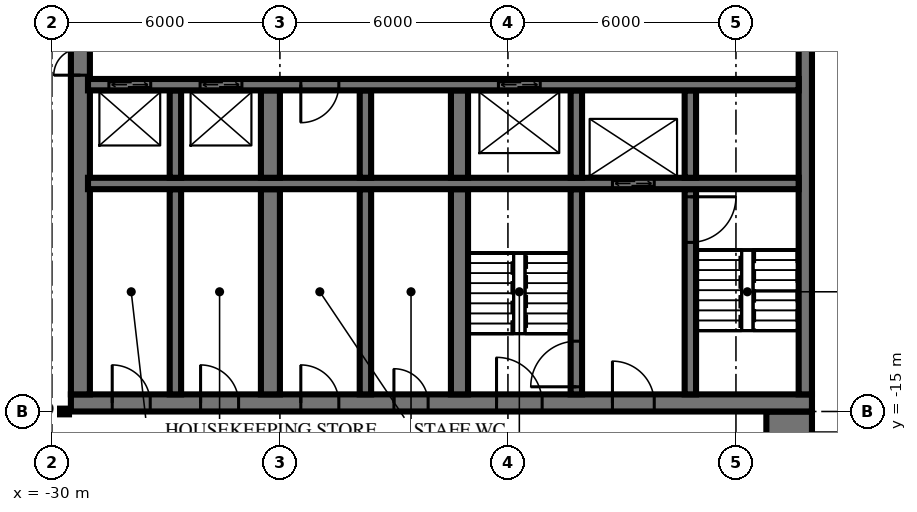
"""IFC4 building model, lengths in metres.
Left out: names, types, materials, properties, quantities, classifications, styles, units other than length and angle.
Written with IfcOpenShell. Run it as: python <this file> out.ifc"""

import sys

from ifc_helpers import new_model, si_unit, direction, frame, frame_2d, origin, place, context, subcontext, project, spatial, rectangle, extrude, element, fill, save


model = new_model("IFC4")
c1 = context("Model", 3, precision=1e-05, world=origin(), true_north=direction((0.0, 1.0)))
c2 = subcontext(c1, "Body", "Model", "MODEL_VIEW")
j1 = project(units=[si_unit("LENGTHUNIT", "METRE"), si_unit("PLANEANGLEUNIT", "RADIAN")], contexts=[c1])
p1 = place(None, origin())
s1 = spatial("IfcSite", under=j1, at=p1, CompositionType="ELEMENT")
p2 = place(p1, origin())
s2 = spatial("IfcBuilding", under=s1, at=p2, CompositionType="ELEMENT")
p3 = place(p2, frame((0.0, 0.0, 12.5)))
s3 = spatial("IfcBuildingStorey", under=s2, at=p3, CompositionType="ELEMENT", Elevation=12.5)
p4 = place(p3, frame((-29.5, -14.775, 0.0), z_axis=(0.0, 0.0, 1.0), x_axis=(1.0, 0.0, 0.0)))
e1 = element("IfcWall", 1, at=p4, inside=s3, PredefinedType="SHEAR", context=c2, shape_type="SweptSolid", body=[
    extrude(rectangle(XDim=19.5, YDim=0.45, at=frame_2d((9.75, 0.0))), origin(), (0.0, 0.0, 1.0), 5.5),
])
p5 = place(p4, frame((11.2, 0.0, 0.0)))
e2 = element("IfcOpeningElement", 2, at=p5, cuts=e1, PredefinedType="OPENING", context=c2, shape_type="SweptSolid", body=[
    extrude(rectangle(XDim=1.2, YDim=2.1, at=frame_2d((0.6, 1.05))), frame((0.0, 0.235, 0.0), z_axis=(0.0, -1.0, 0.0), x_axis=(1.0, 0.0, 0.0)), (0.0, 0.0, 1.0), 0.47),
])
p6 = place(p4, frame((14.25, 0.0, 0.0)))
e3 = element("IfcOpeningElement", 3, at=p6, cuts=e1, PredefinedType="OPENING", context=c2, shape_type="SweptSolid", body=[
    extrude(rectangle(XDim=1.1, YDim=2.1, at=frame_2d((0.55, 1.05))), frame((0.0, 0.235, 0.0), z_axis=(0.0, -1.0, 0.0), x_axis=(1.0, 0.0, 0.0)), (0.0, 0.0, 1.0), 0.47),
])
p7 = place(p4, frame((8.5, 0.0, 0.0)))
e4 = element("IfcOpeningElement", 4, at=p7, cuts=e1, PredefinedType="OPENING", context=c2, shape_type="SweptSolid", body=[
    extrude(rectangle(XDim=0.9, YDim=2.1, at=frame_2d((0.45, 1.05))), frame((0.0, 0.235, 0.0), z_axis=(0.0, -1.0, 0.0), x_axis=(1.0, 0.0, 0.0)), (0.0, 0.0, 1.0), 0.47),
])
p8 = place(p4, frame((6.05, 0.0, 0.0)))
e5 = element("IfcOpeningElement", 5, at=p8, cuts=e1, PredefinedType="OPENING", context=c2, shape_type="SweptSolid", body=[
    extrude(rectangle(XDim=1.0, YDim=2.1, at=frame_2d((0.5, 1.05))), frame((0.0, 0.235, 0.0), z_axis=(0.0, -1.0, 0.0), x_axis=(1.0, 0.0, 0.0)), (0.0, 0.0, 1.0), 0.47),
])
p9 = place(p4, frame((3.413, 0.0, 0.0)))
e6 = element("IfcOpeningElement", 6, at=p9, cuts=e1, PredefinedType="OPENING", context=c2, shape_type="SweptSolid", body=[
    extrude(rectangle(XDim=1.0, YDim=2.1, at=frame_2d((0.5, 1.05))), frame((0.0, 0.235, 0.0), z_axis=(0.0, -1.0, 0.0), x_axis=(1.0, 0.0, 0.0)), (0.0, 0.0, 1.0), 0.47),
])
p10 = place(p4, frame((1.087, 0.0, 0.0)))
e7 = element("IfcOpeningElement", 7, at=p10, cuts=e1, PredefinedType="OPENING", context=c2, shape_type="SweptSolid", body=[
    extrude(rectangle(XDim=1.0, YDim=2.1, at=frame_2d((0.5, 1.05))), frame((0.0, 0.235, 0.0), z_axis=(0.0, -1.0, 0.0), x_axis=(1.0, 0.0, 0.0)), (0.0, 0.0, 1.0), 0.47),
])
p11 = place(p3, frame((-10.175, -14.55, 0.0), z_axis=(0.0, 0.0, 1.0), x_axis=(0.0, 1.0, 0.0)))
e8 = element("IfcWall", 8, at=p11, inside=s3, PredefinedType="SHEAR", context=c2, shape_type="SweptSolid", body=[
    extrude(rectangle(XDim=14.1, YDim=0.35, at=frame_2d((7.05, 0.0))), origin(), (0.0, 0.0, 1.0), 5.5),
])
p12 = place(p3, frame((-29.25, -14.55, 0.0), z_axis=(0.0, 0.0, 1.0), x_axis=(0.0, 1.0, 0.0)))
e9 = element("IfcWall", 9, at=p12, inside=s3, PredefinedType="SHEAR", context=c2, shape_type="SweptSolid", body=[
    extrude(rectangle(XDim=14.1, YDim=0.5, at=frame_2d((7.05, 0.0))), origin(), (0.0, 0.0, 1.0), 5.5),
])
p13 = place(p12, frame((8.4, 0.0, 0.0)))
e10 = element("IfcOpeningElement", 10, at=p13, cuts=e9, PredefinedType="OPENING", context=c2, shape_type="SweptSolid", body=[
    extrude(rectangle(XDim=1.4, YDim=2.4, at=frame_2d((0.7, 1.2))), frame((0.0, 0.26, 0.0), z_axis=(0.0, -1.0, 0.0), x_axis=(1.0, 0.0, 0.0)), (0.0, 0.0, 1.0), 0.52),
])
p14 = place(p12, frame((10.0, 0.0, 0.0)))
e11 = element("IfcOpeningElement", 11, at=p14, cuts=e9, PredefinedType="OPENING", context=c2, shape_type="SweptSolid", body=[
    extrude(rectangle(XDim=1.4, YDim=2.4, at=frame_2d((0.7, 1.2))), frame((0.0, 0.26, 0.0), z_axis=(0.0, -1.0, 0.0), x_axis=(1.0, 0.0, 0.0)), (0.0, 0.0, 1.0), 0.52),
])
p15 = place(p3, frame((-29.05, -6.4, 0.0), z_axis=(0.0, 0.0, 1.0), x_axis=(1.0, 0.0, 0.0)))
e12 = element("IfcWall", 12, at=p15, inside=s3, PredefinedType="SHEAR", context=c2, shape_type="SweptSolid", body=[
    extrude(rectangle(XDim=18.7, YDim=0.3, at=frame_2d((9.35, 0.0))), origin(), (0.0, 0.0, 1.0), 5.5),
])
p16 = place(p15, frame((2.95, 0.0, 0.0)))
e13 = element("IfcOpeningElement", 13, at=p16, cuts=e12, PredefinedType="OPENING", context=c2, shape_type="SweptSolid", body=[
    extrude(rectangle(XDim=1.1, YDim=2.1, at=frame_2d((0.55, 1.05))), frame((0.0, 0.16, 0.0), z_axis=(0.0, -1.0, 0.0), x_axis=(1.0, 0.0, 0.0)), (0.0, 0.0, 1.0), 0.32),
])
p17 = place(p15, frame((0.55, 0.0, 0.0)))
e14 = element("IfcOpeningElement", 14, at=p17, cuts=e12, PredefinedType="OPENING", context=c2, shape_type="SweptSolid", body=[
    extrude(rectangle(XDim=1.1, YDim=2.1, at=frame_2d((0.55, 1.05))), frame((0.0, 0.16, 0.0), z_axis=(0.0, -1.0, 0.0), x_axis=(1.0, 0.0, 0.0)), (0.0, 0.0, 1.0), 0.32),
])
p18 = place(p15, frame((10.8, 0.0, 0.0)))
e15 = element("IfcOpeningElement", 15, at=p18, cuts=e12, PredefinedType="OPENING", context=c2, shape_type="SweptSolid", body=[
    extrude(rectangle(XDim=1.1, YDim=2.1, at=frame_2d((0.55, 1.05))), frame((0.0, 0.16, 0.0), z_axis=(0.0, -1.0, 0.0), x_axis=(1.0, 0.0, 0.0)), (0.0, 0.0, 1.0), 0.32),
])
p19 = place(p15, frame((5.6, 0.0, 0.0)))
e16 = element("IfcOpeningElement", 16, at=p19, cuts=e12, PredefinedType="OPENING", context=c2, shape_type="SweptSolid", body=[
    extrude(rectangle(XDim=1.0, YDim=2.1, at=frame_2d((0.5, 1.05))), frame((0.0, 0.16, 0.0), z_axis=(0.0, -1.0, 0.0), x_axis=(1.0, 0.0, 0.0)), (0.0, 0.0, 1.0), 0.32),
])
p20 = place(p3, frame((-29.05, -9.0, 0.0), z_axis=(0.0, 0.0, 1.0), x_axis=(1.0, 0.0, 0.0)))
e17 = element("IfcWall", 17, at=p20, inside=s3, PredefinedType="SHEAR", context=c2, shape_type="SweptSolid", body=[
    extrude(rectangle(XDim=18.7, YDim=0.3, at=frame_2d((9.35, 0.0))), origin(), (0.0, 0.0, 1.0), 5.5),
])
p21 = place(p20, frame((13.8, 0.0, 0.0)))
e18 = element("IfcOpeningElement", 18, at=p21, cuts=e17, PredefinedType="OPENING", context=c2, shape_type="SweptSolid", body=[
    extrude(rectangle(XDim=1.1, YDim=2.1, at=frame_2d((0.55, 1.05))), frame((0.0, 0.16, 0.0), z_axis=(0.0, -1.0, 0.0), x_axis=(1.0, 0.0, 0.0)), (0.0, 0.0, 1.0), 0.32),
])
p22 = place(p3, frame((-13.2, -8.85, 0.0), z_axis=(0.0, 0.0, 1.0), x_axis=(0.0, 1.0, 0.0)))
e19 = element("IfcWall", 19, at=p22, inside=s3, PredefinedType="SHEAR", context=c2, shape_type="SweptSolid", body=[
    extrude(rectangle(XDim=2.3, YDim=0.3, at=frame_2d((1.15, 0.0))), origin(), (0.0, 0.0, 1.0), 5.5),
])
p23 = place(p3, frame((-13.2, -14.55, 0.0), z_axis=(0.0, 0.0, 1.0), x_axis=(0.0, 1.0, 0.0)))
e20 = element("IfcWall", 20, at=p23, inside=s3, PredefinedType="SHEAR", context=c2, shape_type="SweptSolid", body=[
    extrude(rectangle(XDim=5.4, YDim=0.3, at=frame_2d((2.7, 0.0))), origin(), (0.0, 0.0, 1.0), 5.5),
])
p24 = place(p23, frame((4.0, 0.0, 0.0)))
e21 = element("IfcOpeningElement", 21, at=p24, cuts=e20, PredefinedType="OPENING", context=c2, shape_type="SweptSolid", body=[
    extrude(rectangle(XDim=1.2, YDim=2.1, at=frame_2d((0.6, 1.05))), frame((0.0, 0.16, 0.0), z_axis=(0.0, -1.0, 0.0), x_axis=(1.0, 0.0, 0.0)), (0.0, 0.0, 1.0), 0.32),
])
p25 = place(p3, frame((-16.2, -8.85, 0.0), z_axis=(0.0, 0.0, 1.0), x_axis=(0.0, 1.0, 0.0)))
e22 = element("IfcWall", 22, at=p25, inside=s3, PredefinedType="SHEAR", context=c2, shape_type="SweptSolid", body=[
    extrude(rectangle(XDim=2.3, YDim=0.3, at=frame_2d((1.15, 0.0))), origin(), (0.0, 0.0, 1.0), 5.5),
])
p26 = place(p3, frame((-16.2, -14.55, 0.0), z_axis=(0.0, 0.0, 1.0), x_axis=(0.0, 1.0, 0.0)))
e23 = element("IfcWall", 23, at=p26, inside=s3, PredefinedType="SHEAR", context=c2, shape_type="SweptSolid", body=[
    extrude(rectangle(XDim=5.4, YDim=0.3, at=frame_2d((2.7, 0.0))), origin(), (0.0, 0.0, 1.0), 5.5),
])
p27 = place(p26, frame((0.2, 0.0, 0.0)))
e24 = element("IfcOpeningElement", 24, at=p27, cuts=e23, PredefinedType="OPENING", context=c2, shape_type="SweptSolid", body=[
    extrude(rectangle(XDim=1.2, YDim=2.1, at=frame_2d((0.6, 1.05))), frame((0.0, 0.16, 0.0), z_axis=(0.0, -1.0, 0.0), x_axis=(1.0, 0.0, 0.0)), (0.0, 0.0, 1.0), 0.32),
])
p28 = place(p3, frame((-19.275, -8.85, 0.0), z_axis=(0.0, 0.0, 1.0), x_axis=(0.0, 1.0, 0.0)))
e25 = element("IfcWall", 25, at=p28, inside=s3, PredefinedType="SHEAR", context=c2, shape_type="SweptSolid", body=[
    extrude(rectangle(XDim=2.3, YDim=0.45, at=frame_2d((1.15, 0.0))), origin(), (0.0, 0.0, 1.0), 5.5),
])
p29 = place(p3, frame((-19.275, -14.55, 0.0), z_axis=(0.0, 0.0, 1.0), x_axis=(0.0, 1.0, 0.0)))
e26 = element("IfcWall", 26, at=p29, inside=s3, PredefinedType="SHEAR", context=c2, shape_type="SweptSolid", body=[
    extrude(rectangle(XDim=5.4, YDim=0.45, at=frame_2d((2.7, 0.0))), origin(), (0.0, 0.0, 1.0), 5.5),
])
p30 = place(p3, frame((-21.75, -8.85, 0.0), z_axis=(0.0, 0.0, 1.0), x_axis=(0.0, 1.0, 0.0)))
e27 = element("IfcWall", 27, at=p30, inside=s3, PredefinedType="SHEAR", context=c2, shape_type="SweptSolid", body=[
    extrude(rectangle(XDim=2.3, YDim=0.3, at=frame_2d((1.15, 0.0))), origin(), (0.0, 0.0, 1.0), 5.5),
])
p31 = place(p3, frame((-21.75, -14.55, 0.0), z_axis=(0.0, 0.0, 1.0), x_axis=(0.0, 1.0, 0.0)))
e28 = element("IfcWall", 28, at=p31, inside=s3, PredefinedType="SHEAR", context=c2, shape_type="SweptSolid", body=[
    extrude(rectangle(XDim=5.4, YDim=0.3, at=frame_2d((2.7, 0.0))), origin(), (0.0, 0.0, 1.0), 5.5),
])
p32 = place(p3, frame((-24.25, -8.85, 0.0), z_axis=(0.0, 0.0, 1.0), x_axis=(0.0, 1.0, 0.0)))
e29 = element("IfcWall", 29, at=p32, inside=s3, PredefinedType="SHEAR", context=c2, shape_type="SweptSolid", body=[
    extrude(rectangle(XDim=2.3, YDim=0.5, at=frame_2d((1.15, 0.0))), origin(), (0.0, 0.0, 1.0), 5.5),
])
p33 = place(p3, frame((-24.25, -14.55, 0.0), z_axis=(0.0, 0.0, 1.0), x_axis=(0.0, 1.0, 0.0)))
e30 = element("IfcWall", 30, at=p33, inside=s3, PredefinedType="SHEAR", context=c2, shape_type="SweptSolid", body=[
    extrude(rectangle(XDim=5.4, YDim=0.5, at=frame_2d((2.7, 0.0))), origin(), (0.0, 0.0, 1.0), 5.5),
])
p34 = place(p3, frame((-26.75, -8.85, 0.0), z_axis=(0.0, 0.0, 1.0), x_axis=(0.0, 1.0, 0.0)))
e31 = element("IfcWall", 31, at=p34, inside=s3, PredefinedType="SHEAR", context=c2, shape_type="SweptSolid", body=[
    extrude(rectangle(XDim=2.3, YDim=0.3, at=frame_2d((1.15, 0.0))), origin(), (0.0, 0.0, 1.0), 5.5),
])
p35 = place(p3, frame((-26.75, -14.55, 0.0), z_axis=(0.0, 0.0, 1.0), x_axis=(0.0, 1.0, 0.0)))
e32 = element("IfcWall", 32, at=p35, inside=s3, PredefinedType="SHEAR", context=c2, shape_type="SweptSolid", body=[
    extrude(rectangle(XDim=5.4, YDim=0.3, at=frame_2d((2.7, 0.0))), origin(), (0.0, 0.0, 1.0), 5.5),
])
p36 = place(p3, frame((-10.6, -40.0, 0.0), z_axis=(0.0, 0.0, 1.0), x_axis=(0.0, 1.0, 0.0)))
e33 = element("IfcWall", 33, at=p36, inside=s3, PredefinedType="SHEAR", context=c2, shape_type="SweptSolid", body=[
    extrude(rectangle(XDim=25.0, YDim=1.2, at=frame_2d((12.5, 0.0))), origin(), (0.0, 0.0, 1.0), 5.5),
])
p37 = place(p3, frame((-47.82, -15.0, 0.0), z_axis=(0.0, 0.0, 1.0), x_axis=(1.0, 0.0, 0.0)))
e34 = element("IfcWall", 34, at=p37, inside=s3, PredefinedType="PARTITIONING", context=c2, shape_type="SweptSolid", body=[
    extrude(rectangle(XDim=18.27, YDim=0.15, at=frame_2d((9.135, 0.0))), origin(), (0.0, 0.0, 1.0), 5.05),
])
p38 = place(p37, frame((1.62, 0.0, 0.0)))
e35 = element("IfcOpeningElement", 35, at=p38, cuts=e34, PredefinedType="OPENING", context=c2, shape_type="SweptSolid", body=[
    extrude(rectangle(XDim=1.0, YDim=2.1, at=frame_2d((0.5, 1.05))), frame((0.0, 0.085, 0.0), z_axis=(0.0, -1.0, 0.0), x_axis=(1.0, 0.0, 0.0)), (0.0, 0.0, 1.0), 0.17),
])
p39 = place(p37, frame((3.84, 0.0, 0.0)))
e36 = element("IfcOpeningElement", 36, at=p39, cuts=e34, PredefinedType="OPENING", context=c2, shape_type="SweptSolid", body=[
    extrude(rectangle(XDim=1.0, YDim=2.1, at=frame_2d((0.5, 1.05))), frame((0.0, 0.085, 0.0), z_axis=(0.0, -1.0, 0.0), x_axis=(1.0, 0.0, 0.0)), (0.0, 0.0, 1.0), 0.17),
])
p40 = place(p37, frame((8.34, 0.0, 0.0)))
e37 = element("IfcOpeningElement", 37, at=p40, cuts=e34, PredefinedType="OPENING", context=c2, shape_type="SweptSolid", body=[
    extrude(rectangle(XDim=1.0, YDim=2.1, at=frame_2d((0.5, 1.05))), frame((0.0, 0.085, 0.0), z_axis=(0.0, -1.0, 0.0), x_axis=(1.0, 0.0, 0.0)), (0.0, 0.0, 1.0), 0.17),
])
p41 = place(p37, frame((13.39, 0.0, 0.0)))
e38 = element("IfcOpeningElement", 38, at=p41, cuts=e34, PredefinedType="OPENING", context=c2, shape_type="SweptSolid", body=[
    extrude(rectangle(XDim=1.0, YDim=2.1, at=frame_2d((0.5, 1.05))), frame((0.0, 0.085, 0.0), z_axis=(0.0, -1.0, 0.0), x_axis=(1.0, 0.0, 0.0)), (0.0, 0.0, 1.0), 0.17),
])
p42 = place(p37, frame((16.62, 0.0, 0.0)))
e39 = element("IfcOpeningElement", 39, at=p42, cuts=e34, PredefinedType="OPENING", context=c2, shape_type="SweptSolid", body=[
    extrude(rectangle(XDim=1.0, YDim=2.1, at=frame_2d((0.5, 1.05))), frame((0.0, 0.085, 0.0), z_axis=(0.0, -1.0, 0.0), x_axis=(1.0, 0.0, 0.0)), (0.0, 0.0, 1.0), 0.17),
])
p43 = place(p16, origin())
e40 = element("IfcDoor", 40, at=p43, inside=s3, OperationType="DOUBLE_DOOR_SLIDING", PredefinedType="USERDEFINED", context=c2, shape_type="SweptSolid", body=[
    extrude(rectangle(XDim=1.1, YDim=2.1, at=frame_2d((0.55, 1.05))), frame((0.0, 0.025, 0.0), z_axis=(0.0, -1.0, 0.0), x_axis=(1.0, 0.0, 0.0)), (0.0, 0.0, 1.0), 0.05),
])
fill(e13, e40)
p44 = place(p17, origin())
e41 = element("IfcDoor", 41, at=p44, inside=s3, OperationType="DOUBLE_DOOR_SLIDING", PredefinedType="USERDEFINED", context=c2, shape_type="SweptSolid", body=[
    extrude(rectangle(XDim=1.1, YDim=2.1, at=frame_2d((0.55, 1.05))), frame((0.0, 0.025, 0.0), z_axis=(0.0, -1.0, 0.0), x_axis=(1.0, 0.0, 0.0)), (0.0, 0.0, 1.0), 0.05),
])
fill(e14, e41)
p45 = place(p21, origin())
e42 = element("IfcDoor", 42, at=p45, inside=s3, OperationType="DOUBLE_DOOR_SLIDING", PredefinedType="USERDEFINED", context=c2, shape_type="SweptSolid", body=[
    extrude(rectangle(XDim=1.1, YDim=2.1, at=frame_2d((0.55, 1.05))), frame((0.0, 0.025, 0.0), z_axis=(0.0, -1.0, 0.0), x_axis=(1.0, 0.0, 0.0)), (0.0, 0.0, 1.0), 0.05),
])
fill(e18, e42)
p46 = place(p18, origin())
e43 = element("IfcDoor", 43, at=p46, inside=s3, OperationType="DOUBLE_DOOR_SLIDING", PredefinedType="USERDEFINED", context=c2, shape_type="SweptSolid", body=[
    extrude(rectangle(XDim=1.1, YDim=2.1, at=frame_2d((0.55, 1.05))), frame((0.0, 0.025, 0.0), z_axis=(0.0, -1.0, 0.0), x_axis=(1.0, 0.0, 0.0)), (0.0, 0.0, 1.0), 0.05),
])
fill(e15, e43)
p47 = place(p13, origin())
e44 = element("IfcDoor", 44, at=p47, inside=s3, OperationType="DOUBLE_DOOR_SINGLE_SWING", PredefinedType="DOOR", context=c2, shape_type="SweptSolid", body=[
    extrude(rectangle(XDim=1.4, YDim=2.4, at=frame_2d((0.7, 1.2))), frame((0.0, 0.025, 0.0), z_axis=(0.0, -1.0, 0.0), x_axis=(1.0, 0.0, 0.0)), (0.0, 0.0, 1.0), 0.05),
])
fill(e10, e44)
p48 = place(p5, origin())
e45 = element("IfcDoor", 45, at=p48, inside=s3, OperationType="SINGLE_SWING_RIGHT", PredefinedType="DOOR", context=c2, shape_type="SweptSolid", body=[
    extrude(rectangle(XDim=1.2, YDim=2.1, at=frame_2d((0.6, 1.05))), frame((0.0, 0.025, 0.0), z_axis=(0.0, -1.0, 0.0), x_axis=(1.0, 0.0, 0.0)), (0.0, 0.0, 1.0), 0.05),
])
fill(e2, e45)
p49 = place(p6, origin())
e46 = element("IfcDoor", 46, at=p49, inside=s3, OperationType="SINGLE_SWING_RIGHT", PredefinedType="DOOR", context=c2, shape_type="SweptSolid", body=[
    extrude(rectangle(XDim=1.1, YDim=2.1, at=frame_2d((0.55, 1.05))), frame((0.0, 0.025, 0.0), z_axis=(0.0, -1.0, 0.0), x_axis=(1.0, 0.0, 0.0)), (0.0, 0.0, 1.0), 0.05),
])
fill(e3, e46)
p50 = place(p7, origin())
e47 = element("IfcDoor", 47, at=p50, inside=s3, OperationType="SINGLE_SWING_RIGHT", PredefinedType="DOOR", context=c2, shape_type="SweptSolid", body=[
    extrude(rectangle(XDim=0.9, YDim=2.1, at=frame_2d((0.45, 1.05))), frame((0.0, 0.025, 0.0), z_axis=(0.0, -1.0, 0.0), x_axis=(1.0, 0.0, 0.0)), (0.0, 0.0, 1.0), 0.05),
])
fill(e4, e47)
p51 = place(p8, origin())
e48 = element("IfcDoor", 48, at=p51, inside=s3, OperationType="SINGLE_SWING_RIGHT", PredefinedType="DOOR", context=c2, shape_type="SweptSolid", body=[
    extrude(rectangle(XDim=1.0, YDim=2.1, at=frame_2d((0.5, 1.05))), frame((0.0, 0.025, 0.0), z_axis=(0.0, -1.0, 0.0), x_axis=(1.0, 0.0, 0.0)), (0.0, 0.0, 1.0), 0.05),
])
fill(e5, e48)
p52 = place(p9, origin())
e49 = element("IfcDoor", 49, at=p52, inside=s3, OperationType="SINGLE_SWING_RIGHT", PredefinedType="DOOR", context=c2, shape_type="SweptSolid", body=[
    extrude(rectangle(XDim=1.0, YDim=2.1, at=frame_2d((0.5, 1.05))), frame((0.0, 0.025, 0.0), z_axis=(0.0, -1.0, 0.0), x_axis=(1.0, 0.0, 0.0)), (0.0, 0.0, 1.0), 0.05),
])
fill(e6, e49)
p53 = place(p10, origin())
e50 = element("IfcDoor", 50, at=p53, inside=s3, OperationType="SINGLE_SWING_RIGHT", PredefinedType="DOOR", context=c2, shape_type="SweptSolid", body=[
    extrude(rectangle(XDim=1.0, YDim=2.1, at=frame_2d((0.5, 1.05))), frame((0.0, 0.025, 0.0), z_axis=(0.0, -1.0, 0.0), x_axis=(1.0, 0.0, 0.0)), (0.0, 0.0, 1.0), 0.05),
])
fill(e7, e50)
p54 = place(p19, frame((0.5, 0.0, 0.0), z_axis=(0.0, 0.0, 1.0), x_axis=(-1.0, 0.0, 0.0)))
e51 = element("IfcDoor", 51, at=p54, inside=s3, OperationType="SINGLE_SWING_LEFT", PredefinedType="DOOR", context=c2, shape_type="SweptSolid", body=[
    extrude(rectangle(XDim=1.0, YDim=2.1, at=frame_2d((0.0, 1.05))), frame((0.0, -0.025, 0.0), z_axis=(0.0, 1.0, 0.0), x_axis=(-1.0, 0.0, 0.0)), (0.0, 0.0, 1.0), 0.05),
])
fill(e16, e51)
p55 = place(p24, frame((0.6, 0.0, 0.0), z_axis=(0.0, 0.0, 1.0), x_axis=(-1.0, 0.0, 0.0)))
e52 = element("IfcDoor", 52, at=p55, inside=s3, OperationType="SINGLE_SWING_RIGHT", PredefinedType="DOOR", context=c2, shape_type="SweptSolid", body=[
    extrude(rectangle(XDim=1.2, YDim=2.1, at=frame_2d((0.0, 1.05))), frame((0.0, -0.025, 0.0), z_axis=(0.0, 1.0, 0.0), x_axis=(-1.0, 0.0, 0.0)), (0.0, 0.0, 1.0), 0.05),
])
fill(e21, e52)
p56 = place(p27, origin())
e53 = element("IfcDoor", 53, at=p56, inside=s3, OperationType="SINGLE_SWING_RIGHT", PredefinedType="DOOR", context=c2, shape_type="SweptSolid", body=[
    extrude(rectangle(XDim=1.2, YDim=2.1, at=frame_2d((0.6, 1.05))), frame((0.0, 0.025, 0.0), z_axis=(0.0, -1.0, 0.0), x_axis=(1.0, 0.0, 0.0)), (0.0, 0.0, 1.0), 0.05),
])
fill(e24, e53)
save(model, sys.argv[1])
